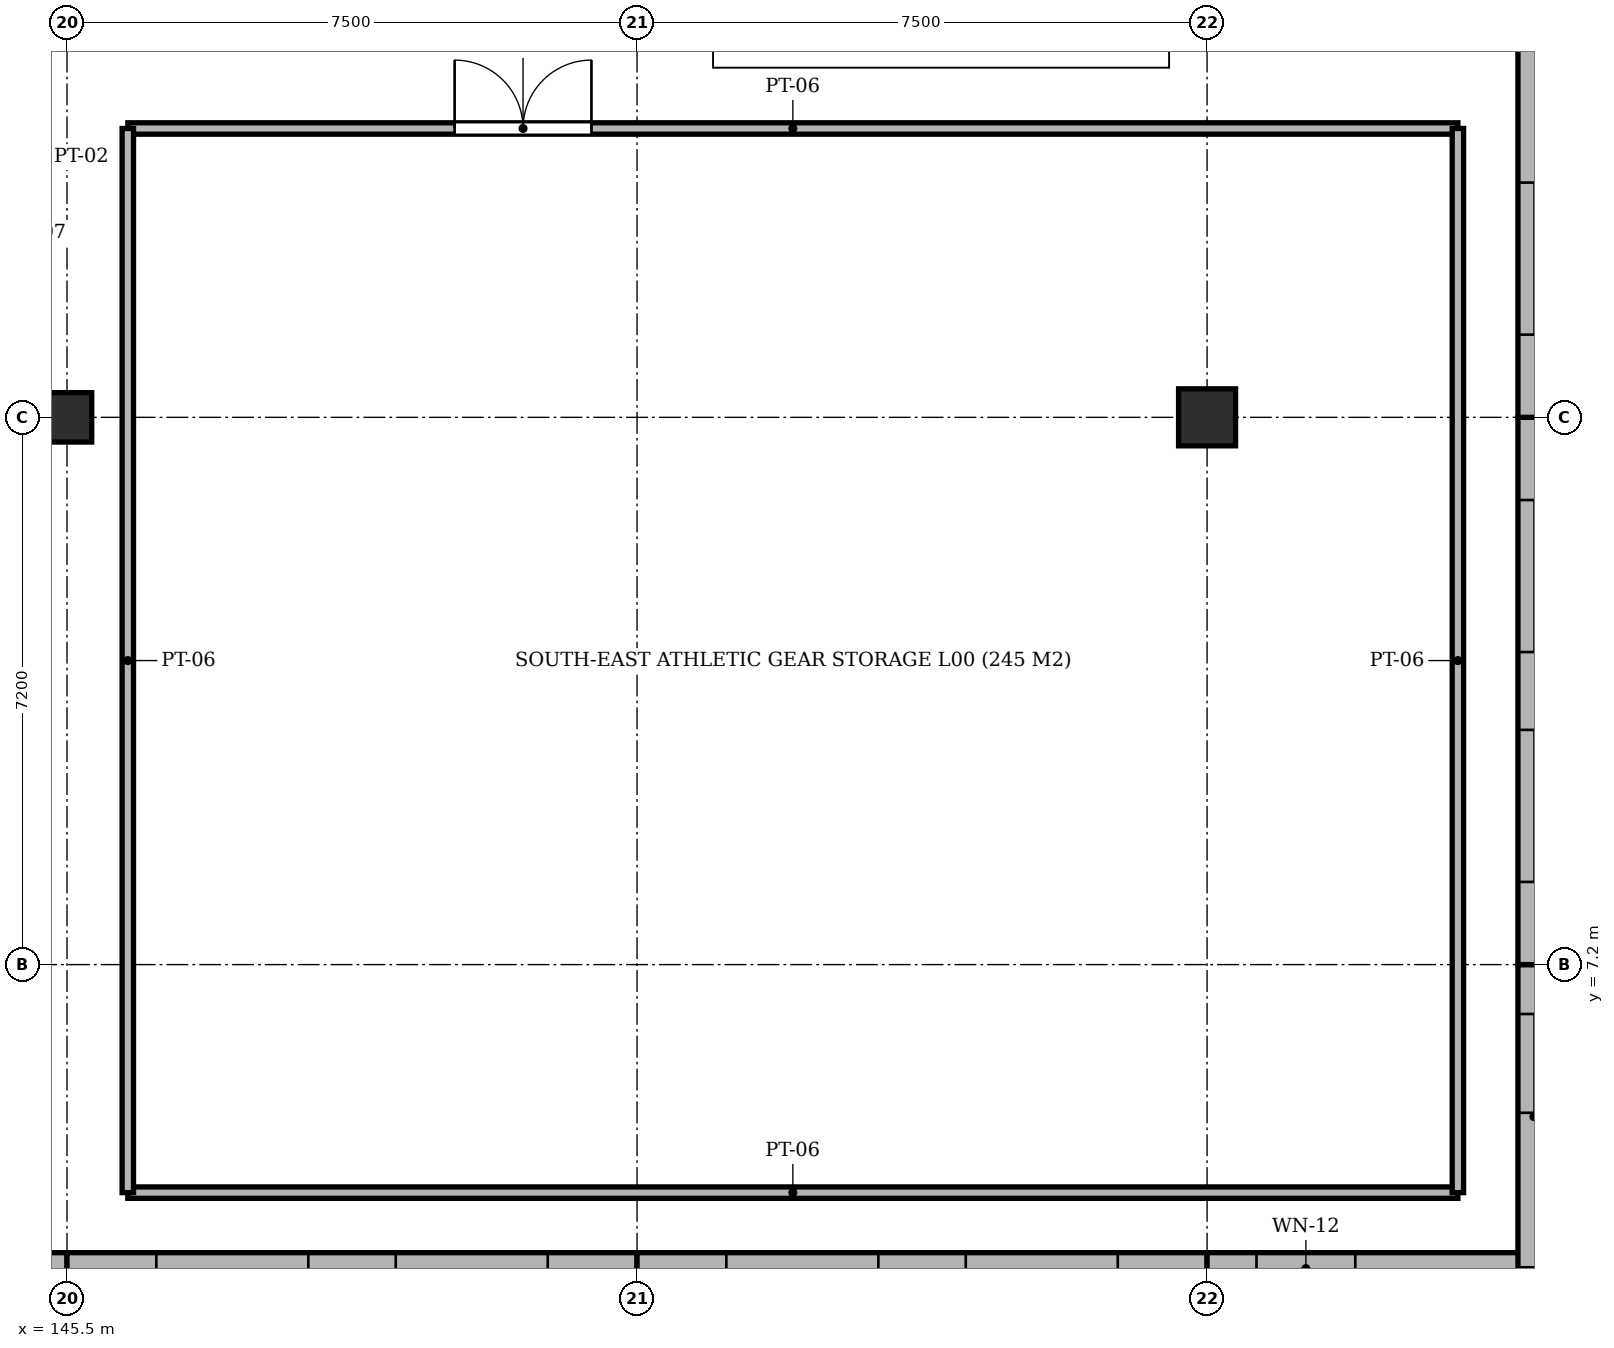
"""IFC4 building model, lengths in metres.
Left out: names, types, materials, properties, quantities, classifications, styles, units other than length and angle.
Written with IfcOpenShell. Run it as: python <this file> out.ifc"""

import sys

from ifc_helpers import new_model, si_unit, direction, frame, frame_2d, origin, origin_2d, place, context, subcontext, project, spatial, rectangle, extrude, element, fill, save


model = new_model("IFC4")
c1 = context("Model", 3, precision=1e-05, world=origin(), true_north=direction((0.0, 1.0)))
c2 = subcontext(c1, "Body", "Model", "MODEL_VIEW")
j1 = project(units=[si_unit("LENGTHUNIT", "METRE"), si_unit("PLANEANGLEUNIT", "RADIAN")], contexts=[c1])
p1 = place(None, origin())
s1 = spatial("IfcSite", under=j1, at=p1, CompositionType="ELEMENT")
p2 = place(p1, origin())
s2 = spatial("IfcBuilding", under=s1, at=p2, CompositionType="ELEMENT")
p3 = place(p2, origin())
s3 = spatial("IfcBuildingStorey", under=s2, at=p3, CompositionType="ELEMENT", Elevation=0.0)
p4 = place(p3, frame((145.5, 14.4, -0.35), z_axis=(0.0, 0.0, 1.0), x_axis=(1.0, 0.0, 0.0)))
e1 = element("IfcColumn", 1, at=p4, inside=s3, PredefinedType="COLUMN", context=c2, shape_type="SweptSolid", body=[
    extrude(rectangle(XDim=0.65, YDim=0.65, at=origin_2d()), origin(), (0.0, 0.0, 1.0), 4.65),
])
p5 = place(p3, frame((160.5, 14.4, -0.35), z_axis=(0.0, 0.0, 1.0), x_axis=(1.0, 0.0, 0.0)))
e2 = element("IfcColumn", 2, at=p5, inside=s3, PredefinedType="COLUMN", context=c2, shape_type="SweptSolid", body=[
    extrude(rectangle(XDim=0.75, YDim=0.75, at=origin_2d()), origin(), (0.0, 0.0, 1.0), 4.65),
])
p6 = place(p3, frame((138.0, 3.2, 0.0), z_axis=(0.0, 0.0, 1.0), x_axis=(1.0, 0.0, 0.0)))
e3 = element("IfcWall", 3, at=p6, inside=s3, PredefinedType="SOLIDWALL", context=c2, shape_type="SweptSolid", body=[
    extrude(rectangle(XDim=7.5, YDim=0.42, at=frame_2d((3.75, 0.0))), origin(), (0.0, 0.0, 1.0), 3.82),
])
p7 = place(p6, frame((1.175, 0.0, 0.92)))
e4 = element("IfcOpeningElement", 4, at=p7, cuts=e3, PredefinedType="OPENING", context=c2, shape_type="SweptSolid", body=[
    extrude(rectangle(XDim=2.0, YDim=1.89, at=frame_2d((1.0, 0.945))), frame((0.0, 0.222, 0.0), z_axis=(0.0, -1.0, 0.0), x_axis=(1.0, 0.0, 0.0)), (0.0, 0.0, 1.0), 0.444),
])
p8 = place(p6, frame((4.325, 0.0, 0.92)))
e5 = element("IfcOpeningElement", 5, at=p8, cuts=e3, PredefinedType="OPENING", context=c2, shape_type="SweptSolid", body=[
    extrude(rectangle(XDim=2.0, YDim=1.89, at=frame_2d((1.0, 0.945))), frame((0.0, 0.222, 0.0), z_axis=(0.0, -1.0, 0.0), x_axis=(1.0, 0.0, 0.0)), (0.0, 0.0, 1.0), 0.444),
])
p9 = place(p3, frame((145.5, 3.2, 0.0), z_axis=(0.0, 0.0, 1.0), x_axis=(1.0, 0.0, 0.0)))
e6 = element("IfcWall", 6, at=p9, inside=s3, PredefinedType="SOLIDWALL", context=c2, shape_type="SweptSolid", body=[
    extrude(rectangle(XDim=7.5, YDim=0.42, at=frame_2d((3.75, 0.0))), origin(), (0.0, 0.0, 1.0), 3.82),
])
p10 = place(p9, frame((1.175, 0.0, 0.92)))
e7 = element("IfcOpeningElement", 7, at=p10, cuts=e6, PredefinedType="OPENING", context=c2, shape_type="SweptSolid", body=[
    extrude(rectangle(XDim=2.0, YDim=1.89, at=frame_2d((1.0, 0.945))), frame((0.0, 0.222, 0.0), z_axis=(0.0, -1.0, 0.0), x_axis=(1.0, 0.0, 0.0)), (0.0, 0.0, 1.0), 0.444),
])
p11 = place(p9, frame((4.325, 0.0, 0.92)))
e8 = element("IfcOpeningElement", 8, at=p11, cuts=e6, PredefinedType="OPENING", context=c2, shape_type="SweptSolid", body=[
    extrude(rectangle(XDim=2.0, YDim=1.89, at=frame_2d((1.0, 0.945))), frame((0.0, 0.222, 0.0), z_axis=(0.0, -1.0, 0.0), x_axis=(1.0, 0.0, 0.0)), (0.0, 0.0, 1.0), 0.444),
])
p12 = place(p3, frame((153.0, 3.2, 0.0), z_axis=(0.0, 0.0, 1.0), x_axis=(1.0, 0.0, 0.0)))
e9 = element("IfcWall", 9, at=p12, inside=s3, PredefinedType="SOLIDWALL", context=c2, shape_type="SweptSolid", body=[
    extrude(rectangle(XDim=7.5, YDim=0.42, at=frame_2d((3.75, 0.0))), origin(), (0.0, 0.0, 1.0), 3.82),
])
p13 = place(p12, frame((1.175, 0.0, 0.92)))
e10 = element("IfcOpeningElement", 10, at=p13, cuts=e9, PredefinedType="OPENING", context=c2, shape_type="SweptSolid", body=[
    extrude(rectangle(XDim=2.0, YDim=1.89, at=frame_2d((1.0, 0.945))), frame((0.0, 0.222, 0.0), z_axis=(0.0, -1.0, 0.0), x_axis=(1.0, 0.0, 0.0)), (0.0, 0.0, 1.0), 0.444),
])
p14 = place(p12, frame((4.325, 0.0, 0.92)))
e11 = element("IfcOpeningElement", 11, at=p14, cuts=e9, PredefinedType="OPENING", context=c2, shape_type="SweptSolid", body=[
    extrude(rectangle(XDim=2.0, YDim=1.89, at=frame_2d((1.0, 0.945))), frame((0.0, 0.222, 0.0), z_axis=(0.0, -1.0, 0.0), x_axis=(1.0, 0.0, 0.0)), (0.0, 0.0, 1.0), 0.444),
])
p15 = place(p3, frame((160.5, 3.2, 0.0), z_axis=(0.0, 0.0, 1.0), x_axis=(1.0, 0.0, 0.0)))
e12 = element("IfcWall", 12, at=p15, inside=s3, PredefinedType="SOLIDWALL", context=c2, shape_type="SweptSolid", body=[
    extrude(rectangle(XDim=4.3, YDim=0.42, at=frame_2d((2.15, 0.0))), origin(), (0.0, 0.0, 1.0), 3.82),
])
p16 = place(p15, frame((0.65, 0.0, 0.92)))
e13 = element("IfcOpeningElement", 13, at=p16, cuts=e12, PredefinedType="OPENING", context=c2, shape_type="SweptSolid", body=[
    extrude(rectangle(XDim=1.3, YDim=1.8, at=frame_2d((0.65, 0.9))), frame((0.0, 0.222, 0.0), z_axis=(0.0, -1.0, 0.0), x_axis=(1.0, 0.0, 0.0)), (0.0, 0.0, 1.0), 0.444),
])
p17 = place(p3, frame((164.8, 3.2, 0.0), z_axis=(0.0, 0.0, 1.0), x_axis=(0.0, 1.0, 0.0)))
e14 = element("IfcWall", 14, at=p17, inside=s3, PredefinedType="SOLIDWALL", context=c2, shape_type="SweptSolid", body=[
    extrude(rectangle(XDim=4.0, YDim=0.42, at=frame_2d((2.0, 0.0))), origin(), (0.0, 0.0, 1.0), 3.82),
])
p18 = place(p17, frame((2.05, 0.0, 0.92)))
e15 = element("IfcOpeningElement", 15, at=p18, cuts=e14, PredefinedType="OPENING", context=c2, shape_type="SweptSolid", body=[
    extrude(rectangle(XDim=1.3, YDim=1.8, at=frame_2d((0.65, 0.9))), frame((0.0, 0.222, 0.0), z_axis=(0.0, -1.0, 0.0), x_axis=(1.0, 0.0, 0.0)), (0.0, 0.0, 1.0), 0.444),
])
p19 = place(p3, frame((164.8, 7.2, 0.0), z_axis=(0.0, 0.0, 1.0), x_axis=(0.0, 1.0, 0.0)))
e16 = element("IfcWall", 16, at=p19, inside=s3, PredefinedType="SOLIDWALL", context=c2, shape_type="SweptSolid", body=[
    extrude(rectangle(XDim=7.2, YDim=0.42, at=frame_2d((3.6, 0.0))), origin(), (0.0, 0.0, 1.0), 3.82),
])
p20 = place(p19, frame((1.088, 0.0, 0.92)))
e17 = element("IfcOpeningElement", 17, at=p20, cuts=e16, PredefinedType="OPENING", context=c2, shape_type="SweptSolid", body=[
    extrude(rectangle(XDim=2.0, YDim=1.89, at=frame_2d((1.0, 0.945))), frame((0.0, 0.222, 0.0), z_axis=(0.0, -1.0, 0.0), x_axis=(1.0, 0.0, 0.0)), (0.0, 0.0, 1.0), 0.444),
])
p21 = place(p19, frame((4.112, 0.0, 0.92)))
e18 = element("IfcOpeningElement", 18, at=p21, cuts=e16, PredefinedType="OPENING", context=c2, shape_type="SweptSolid", body=[
    extrude(rectangle(XDim=2.0, YDim=1.89, at=frame_2d((1.0, 0.945))), frame((0.0, 0.222, 0.0), z_axis=(0.0, -1.0, 0.0), x_axis=(1.0, 0.0, 0.0)), (0.0, 0.0, 1.0), 0.444),
])
p22 = place(p3, frame((164.8, 14.4, 0.0), z_axis=(0.0, 0.0, 1.0), x_axis=(0.0, 1.0, 0.0)))
e19 = element("IfcWall", 19, at=p22, inside=s3, PredefinedType="SOLIDWALL", context=c2, shape_type="SweptSolid", body=[
    extrude(rectangle(XDim=7.2, YDim=0.42, at=frame_2d((3.6, 0.0))), origin(), (0.0, 0.0, 1.0), 3.82),
])
p23 = place(p22, frame((1.088, 0.0, 0.92)))
e20 = element("IfcOpeningElement", 20, at=p23, cuts=e19, PredefinedType="OPENING", context=c2, shape_type="SweptSolid", body=[
    extrude(rectangle(XDim=2.0, YDim=1.89, at=frame_2d((1.0, 0.945))), frame((0.0, 0.222, 0.0), z_axis=(0.0, -1.0, 0.0), x_axis=(1.0, 0.0, 0.0)), (0.0, 0.0, 1.0), 0.444),
])
p24 = place(p3, frame((146.3, 4.2, 0.0), z_axis=(0.0, 0.0, 1.0), x_axis=(1.0, 0.0, 0.0)))
e21 = element("IfcWall", 21, at=p24, inside=s3, PredefinedType="PARTITIONING", context=c2, shape_type="SweptSolid", body=[
    extrude(rectangle(XDim=17.5, YDim=0.15, at=frame_2d((8.75, 0.0))), origin(), (0.0, 0.0, 1.0), 3.88),
])
p25 = place(p3, frame((146.3, 18.2, 0.0), z_axis=(0.0, 0.0, 1.0), x_axis=(1.0, 0.0, 0.0)))
e22 = element("IfcWall", 22, at=p25, inside=s3, PredefinedType="PARTITIONING", context=c2, shape_type="SweptSolid", body=[
    extrude(rectangle(XDim=17.5, YDim=0.15, at=frame_2d((8.75, 0.0))), origin(), (0.0, 0.0, 1.0), 3.88),
])
p26 = place(p25, frame((4.3, 0.0, 0.0)))
e23 = element("IfcOpeningElement", 23, at=p26, cuts=e22, PredefinedType="OPENING", context=c2, shape_type="SweptSolid", body=[
    extrude(rectangle(XDim=1.8, YDim=2.25, at=frame_2d((0.9, 1.125))), frame((0.0, 0.087, 0.0), z_axis=(0.0, -1.0, 0.0), x_axis=(1.0, 0.0, 0.0)), (0.0, 0.0, 1.0), 0.174),
])
for number, where, z_axis, x_axis in (
    (24, (146.3, 4.2, 0.0), (0.0, 0.0, 1.0), (0.0, 1.0, 0.0)),
    (25, (163.8, 4.2, 0.0), (0.0, 0.0, 1.0), (0.0, 1.0, 0.0)),
):
    element("IfcWall", number, at=place(p3, frame(where, z_axis=z_axis, x_axis=x_axis)), inside=s3, PredefinedType="PARTITIONING", context=c2, shape_type="SweptSolid", body=[
        extrude(rectangle(XDim=14.0, YDim=0.15, at=frame_2d((7.0, 0.0))), origin(), (0.0, 0.0, 1.0), 3.88),
    ])
p27 = place(p10, origin())
e26 = element("IfcWindow", 26, at=p27, inside=s3, PartitioningType="SINGLE_PANEL", PredefinedType="WINDOW", context=c2, shape_type="SweptSolid", body=[
    extrude(rectangle(XDim=2.0, YDim=1.89, at=frame_2d((1.0, 0.945))), frame((0.0, 0.03, 0.0), z_axis=(0.0, -1.0, 0.0), x_axis=(1.0, 0.0, 0.0)), (0.0, 0.0, 1.0), 0.06),
])
fill(e7, e26)
p28 = place(p11, origin())
e27 = element("IfcWindow", 27, at=p28, inside=s3, PartitioningType="SINGLE_PANEL", PredefinedType="WINDOW", context=c2, shape_type="SweptSolid", body=[
    extrude(rectangle(XDim=2.0, YDim=1.89, at=frame_2d((1.0, 0.945))), frame((0.0, 0.03, 0.0), z_axis=(0.0, -1.0, 0.0), x_axis=(1.0, 0.0, 0.0)), (0.0, 0.0, 1.0), 0.06),
])
fill(e8, e27)
p29 = place(p13, origin())
e28 = element("IfcWindow", 28, at=p29, inside=s3, PartitioningType="SINGLE_PANEL", PredefinedType="WINDOW", context=c2, shape_type="SweptSolid", body=[
    extrude(rectangle(XDim=2.0, YDim=1.89, at=frame_2d((1.0, 0.945))), frame((0.0, 0.03, 0.0), z_axis=(0.0, -1.0, 0.0), x_axis=(1.0, 0.0, 0.0)), (0.0, 0.0, 1.0), 0.06),
])
fill(e10, e28)
p30 = place(p14, origin())
e29 = element("IfcWindow", 29, at=p30, inside=s3, PartitioningType="SINGLE_PANEL", PredefinedType="WINDOW", context=c2, shape_type="SweptSolid", body=[
    extrude(rectangle(XDim=2.0, YDim=1.89, at=frame_2d((1.0, 0.945))), frame((0.0, 0.03, 0.0), z_axis=(0.0, -1.0, 0.0), x_axis=(1.0, 0.0, 0.0)), (0.0, 0.0, 1.0), 0.06),
])
fill(e11, e29)
p31 = place(p16, origin())
e30 = element("IfcWindow", 30, at=p31, inside=s3, PartitioningType="SINGLE_PANEL", PredefinedType="WINDOW", context=c2, shape_type="SweptSolid", body=[
    extrude(rectangle(XDim=1.3, YDim=1.8, at=frame_2d((0.65, 0.9))), frame((0.0, 0.03, 0.0), z_axis=(0.0, -1.0, 0.0), x_axis=(1.0, 0.0, 0.0)), (0.0, 0.0, 1.0), 0.06),
])
fill(e13, e30)
p32 = place(p18, origin())
e31 = element("IfcWindow", 31, at=p32, inside=s3, PartitioningType="SINGLE_PANEL", PredefinedType="WINDOW", context=c2, shape_type="SweptSolid", body=[
    extrude(rectangle(XDim=1.3, YDim=1.8, at=frame_2d((0.65, 0.9))), frame((0.0, 0.03, 0.0), z_axis=(0.0, -1.0, 0.0), x_axis=(1.0, 0.0, 0.0)), (0.0, 0.0, 1.0), 0.06),
])
fill(e15, e31)
p33 = place(p20, origin())
e32 = element("IfcWindow", 32, at=p33, inside=s3, PartitioningType="SINGLE_PANEL", PredefinedType="WINDOW", context=c2, shape_type="SweptSolid", body=[
    extrude(rectangle(XDim=2.0, YDim=1.89, at=frame_2d((1.0, 0.945))), frame((0.0, 0.03, 0.0), z_axis=(0.0, -1.0, 0.0), x_axis=(1.0, 0.0, 0.0)), (0.0, 0.0, 1.0), 0.06),
])
fill(e17, e32)
p34 = place(p21, origin())
e33 = element("IfcWindow", 33, at=p34, inside=s3, PartitioningType="SINGLE_PANEL", PredefinedType="WINDOW", context=c2, shape_type="SweptSolid", body=[
    extrude(rectangle(XDim=2.0, YDim=1.89, at=frame_2d((1.0, 0.945))), frame((0.0, 0.03, 0.0), z_axis=(0.0, -1.0, 0.0), x_axis=(1.0, 0.0, 0.0)), (0.0, 0.0, 1.0), 0.06),
])
fill(e18, e33)
p35 = place(p23, origin())
e34 = element("IfcWindow", 34, at=p35, inside=s3, PartitioningType="SINGLE_PANEL", PredefinedType="WINDOW", context=c2, shape_type="SweptSolid", body=[
    extrude(rectangle(XDim=2.0, YDim=1.89, at=frame_2d((1.0, 0.945))), frame((0.0, 0.03, 0.0), z_axis=(0.0, -1.0, 0.0), x_axis=(1.0, 0.0, 0.0)), (0.0, 0.0, 1.0), 0.06),
])
fill(e20, e34)
p36 = place(p26, origin())
e35 = element("IfcDoor", 35, at=p36, inside=s3, OperationType="DOUBLE_DOOR_SINGLE_SWING", PredefinedType="DOOR", context=c2, shape_type="SweptSolid", body=[
    extrude(rectangle(XDim=1.8, YDim=2.25, at=frame_2d((0.9, 1.125))), frame((0.0, 0.025, 0.0), z_axis=(0.0, -1.0, 0.0), x_axis=(1.0, 0.0, 0.0)), (0.0, 0.0, 1.0), 0.05),
])
fill(e23, e35)
save(model, sys.argv[1])
